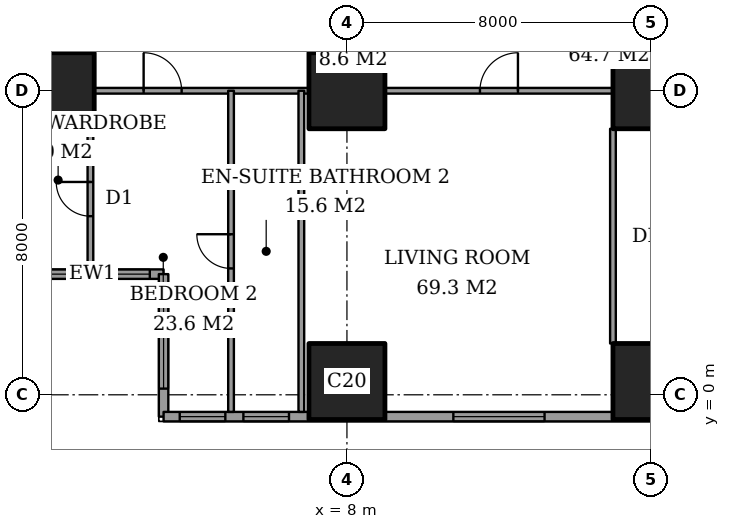
"""IFC4 building model, lengths in metres.
Left out: names, types, materials, properties, quantities, classifications, styles, units other than length and angle.
Written with IfcOpenShell. Run it as: python <this file> out.ifc"""

import sys

from ifc_helpers import new_model, si_unit, direction, frame, frame_2d, origin, origin_2d, place, context, subcontext, project, spatial, rectangle, extrude, element, fill, save


model = new_model("IFC4")
c1 = context("Model", 3, precision=1e-05, world=origin(), true_north=direction((0.0, 1.0)))
c2 = subcontext(c1, "Body", "Model", "MODEL_VIEW")
j1 = project(units=[si_unit("LENGTHUNIT", "METRE"), si_unit("PLANEANGLEUNIT", "RADIAN")], contexts=[c1])
p1 = place(None, origin())
s1 = spatial("IfcSite", under=j1, at=p1, CompositionType="ELEMENT")
p2 = place(p1, origin())
s2 = spatial("IfcBuilding", under=s1, at=p2, CompositionType="ELEMENT")
p3 = place(p2, frame((0.0, 0.0, 87.2)))
s3 = spatial("IfcBuildingStorey", under=s2, at=p3, CompositionType="ELEMENT", Elevation=87.2)
for number, where, z_axis, x_axis in (
    (1, (0.35, 8.0, 0.0), (0.0, 0.0, 1.0), (1.0, 0.0, 0.0)),
    (2, (8.0, 0.35, 0.0), (0.0, 0.0, 1.0), (1.0, 0.0, 0.0)),
    (3, (8.0, 8.0, 0.0), (0.0, 0.0, 1.0), (1.0, 0.0, 0.0)),
    (4, (16.0, 0.35, 0.0), (0.0, 0.0, 1.0), (1.0, 0.0, 0.0)),
    (5, (16.0, 8.0, 0.0), (0.0, 0.0, 1.0), (1.0, 0.0, 0.0)),
):
    element("IfcColumn", number, at=place(p3, frame(where, z_axis=z_axis, x_axis=x_axis)), inside=s3, PredefinedType="COLUMN", context=c2, shape_type="SweptSolid", body=[
        extrude(rectangle(XDim=2.0, YDim=2.0, at=origin_2d()), origin(), (0.0, 0.0, 1.0), 3.6),
    ])
p4 = place(p3, frame((-0.575, 3.175, 0.0), z_axis=(0.0, 0.0, 1.0), x_axis=(1.0, 0.0, 0.0)))
e6 = element("IfcWall", 6, at=p4, inside=s3, PredefinedType="SOLIDWALL", context=c2, shape_type="SweptSolid", body=[
    extrude(rectangle(XDim=3.75, YDim=0.25, at=frame_2d((1.875, 0.0))), origin(), (0.0, 0.0, 1.0), 3.6),
])
p5 = place(p4, frame((0.45, 0.0, 0.6)))
e7 = element("IfcOpeningElement", 7, at=p5, cuts=e6, PredefinedType="OPENING", context=c2, shape_type="SweptSolid", body=[
    extrude(rectangle(XDim=1.2, YDim=2.0, at=frame_2d((0.6, 1.0))), frame((0.0, 0.135, 0.0), z_axis=(0.0, -1.0, 0.0), x_axis=(1.0, 0.0, 0.0)), (0.0, 0.0, 1.0), 0.27),
])
p6 = place(p4, frame((2.188, 0.0, 0.6)))
e8 = element("IfcOpeningElement", 8, at=p6, cuts=e6, PredefinedType="OPENING", context=c2, shape_type="SweptSolid", body=[
    extrude(rectangle(XDim=1.2, YDim=2.0, at=frame_2d((0.6, 1.0))), frame((0.0, 0.135, 0.0), z_axis=(0.0, -1.0, 0.0), x_axis=(1.0, 0.0, 0.0)), (0.0, 0.0, 1.0), 0.27),
])
p7 = place(p3, frame((3.175, 3.175, 0.0), z_axis=(0.0, 0.0, 1.0), x_axis=(0.0, -1.0, 0.0)))
e9 = element("IfcWall", 9, at=p7, inside=s3, PredefinedType="SOLIDWALL", context=c2, shape_type="SweptSolid", body=[
    extrude(rectangle(XDim=3.75, YDim=0.25, at=frame_2d((1.875, 0.0))), origin(), (0.0, 0.0, 1.0), 3.6),
])
p8 = place(p7, frame((0.613, 0.0, 0.6)))
e10 = element("IfcOpeningElement", 10, at=p8, cuts=e9, PredefinedType="OPENING", context=c2, shape_type="SweptSolid", body=[
    extrude(rectangle(XDim=2.4, YDim=2.0, at=frame_2d((1.2, 1.0))), frame((0.0, 0.135, 0.0), z_axis=(0.0, -1.0, 0.0), x_axis=(1.0, 0.0, 0.0)), (0.0, 0.0, 1.0), 0.27),
])
p9 = place(p3, frame((3.175, -0.575, 0.0), z_axis=(0.0, 0.0, 1.0), x_axis=(1.0, 0.0, 0.0)))
e11 = element("IfcWall", 11, at=p9, inside=s3, PredefinedType="SOLIDWALL", context=c2, shape_type="SweptSolid", body=[
    extrude(rectangle(XDim=21.4, YDim=0.25, at=frame_2d((10.7, 0.0))), origin(), (0.0, 0.0, 1.0), 3.6),
])
p10 = place(p9, frame((0.425, 0.0, 0.6)))
e12 = element("IfcOpeningElement", 12, at=p10, cuts=e11, PredefinedType="OPENING", context=c2, shape_type="SweptSolid", body=[
    extrude(rectangle(XDim=1.2, YDim=2.0, at=frame_2d((0.6, 1.0))), frame((0.0, 0.135, 0.0), z_axis=(0.0, -1.0, 0.0), x_axis=(1.0, 0.0, 0.0)), (0.0, 0.0, 1.0), 0.27),
])
p11 = place(p9, frame((2.1, 0.0, 0.6)))
e13 = element("IfcOpeningElement", 13, at=p11, cuts=e11, PredefinedType="OPENING", context=c2, shape_type="SweptSolid", body=[
    extrude(rectangle(XDim=1.2, YDim=2.0, at=frame_2d((0.6, 1.0))), frame((0.0, 0.135, 0.0), z_axis=(0.0, -1.0, 0.0), x_axis=(1.0, 0.0, 0.0)), (0.0, 0.0, 1.0), 0.27),
])
p12 = place(p9, frame((7.625, 0.0, 0.6)))
e14 = element("IfcOpeningElement", 14, at=p12, cuts=e11, PredefinedType="OPENING", context=c2, shape_type="SweptSolid", body=[
    extrude(rectangle(XDim=2.4, YDim=2.0, at=frame_2d((1.2, 1.0))), frame((0.0, 0.135, 0.0), z_axis=(0.0, -1.0, 0.0), x_axis=(1.0, 0.0, 0.0)), (0.0, 0.0, 1.0), 0.27),
])
p13 = place(p9, frame((14.725, 0.0, 0.6)))
e15 = element("IfcOpeningElement", 15, at=p13, cuts=e11, PredefinedType="OPENING", context=c2, shape_type="SweptSolid", body=[
    extrude(rectangle(XDim=1.2, YDim=2.0, at=frame_2d((0.6, 1.0))), frame((0.0, 0.135, 0.0), z_axis=(0.0, -1.0, 0.0), x_axis=(1.0, 0.0, 0.0)), (0.0, 0.0, 1.0), 0.27),
])
p14 = place(p9, frame((17.55, 0.0, 0.6)))
e16 = element("IfcOpeningElement", 16, at=p14, cuts=e11, PredefinedType="OPENING", context=c2, shape_type="SweptSolid", body=[
    extrude(rectangle(XDim=1.2, YDim=2.0, at=frame_2d((0.6, 1.0))), frame((0.0, 0.135, 0.0), z_axis=(0.0, -1.0, 0.0), x_axis=(1.0, 0.0, 0.0)), (0.0, 0.0, 1.0), 0.27),
])
p15 = place(p3, frame((1.35, 8.0, 0.0), z_axis=(0.0, 0.0, 1.0), x_axis=(1.0, 0.0, 0.0)))
e17 = element("IfcWall", 17, at=p15, inside=s3, PredefinedType="PARTITIONING", context=c2, shape_type="SweptSolid", body=[
    extrude(rectangle(XDim=5.65, YDim=0.15, at=frame_2d((2.825, 0.0))), origin(), (0.0, 0.0, 1.0), 3.25),
])
p16 = place(p15, frame((1.3, 0.0, 0.0)))
e18 = element("IfcOpeningElement", 18, at=p16, cuts=e17, PredefinedType="OPENING", context=c2, shape_type="SweptSolid", body=[
    extrude(rectangle(XDim=1.0, YDim=2.1, at=frame_2d((0.5, 1.05))), frame((0.0, 0.085, 0.0), z_axis=(0.0, -1.0, 0.0), x_axis=(1.0, 0.0, 0.0)), (0.0, 0.0, 1.0), 0.17),
])
p17 = place(p3, frame((9.0, 8.0, 0.0), z_axis=(0.0, 0.0, 1.0), x_axis=(1.0, 0.0, 0.0)))
e19 = element("IfcWall", 19, at=p17, inside=s3, PredefinedType="PARTITIONING", context=c2, shape_type="SweptSolid", body=[
    extrude(rectangle(XDim=6.0, YDim=0.15, at=frame_2d((3.0, 0.0))), origin(), (0.0, 0.0, 1.0), 3.25),
])
p18 = place(p17, frame((2.5, 0.0, 0.0)))
e20 = element("IfcOpeningElement", 20, at=p18, cuts=e19, PredefinedType="OPENING", context=c2, shape_type="SweptSolid", body=[
    extrude(rectangle(XDim=1.0, YDim=2.1, at=frame_2d((0.5, 1.05))), frame((0.0, 0.085, 0.0), z_axis=(0.0, -1.0, 0.0), x_axis=(1.0, 0.0, 0.0)), (0.0, 0.0, 1.0), 0.17),
])
p19 = place(p3, frame((1.25, 3.3, 0.0), z_axis=(0.0, 0.0, 1.0), x_axis=(0.0, 1.0, 0.0)))
e21 = element("IfcWall", 21, at=p19, inside=s3, PredefinedType="PARTITIONING", context=c2, shape_type="SweptSolid", body=[
    extrude(rectangle(XDim=3.7, YDim=0.15, at=frame_2d((1.85, 0.0))), origin(), (0.0, 0.0, 1.0), 3.25),
])
p20 = place(p19, frame((1.4, 0.0, 0.0)))
e22 = element("IfcOpeningElement", 22, at=p20, cuts=e21, PredefinedType="OPENING", context=c2, shape_type="SweptSolid", body=[
    extrude(rectangle(XDim=0.9, YDim=2.1, at=frame_2d((0.45, 1.05))), frame((0.0, 0.085, 0.0), z_axis=(0.0, -1.0, 0.0), x_axis=(1.0, 0.0, 0.0)), (0.0, 0.0, 1.0), 0.17),
])
p21 = place(p3, frame((4.95, -0.45, 0.0), z_axis=(0.0, 0.0, 1.0), x_axis=(0.0, 1.0, 0.0)))
e23 = element("IfcWall", 23, at=p21, inside=s3, PredefinedType="PARTITIONING", context=c2, shape_type="SweptSolid", body=[
    extrude(rectangle(XDim=8.45, YDim=0.15, at=frame_2d((4.225, 0.0))), origin(), (0.0, 0.0, 1.0), 3.25),
])
p22 = place(p21, frame((3.775, 0.0, 0.0)))
e24 = element("IfcOpeningElement", 24, at=p22, cuts=e23, PredefinedType="OPENING", context=c2, shape_type="SweptSolid", body=[
    extrude(rectangle(XDim=0.9, YDim=2.1, at=frame_2d((0.45, 1.05))), frame((0.0, 0.085, 0.0), z_axis=(0.0, -1.0, 0.0), x_axis=(1.0, 0.0, 0.0)), (0.0, 0.0, 1.0), 0.17),
])
p23 = place(p3, frame((6.8, -0.45, 0.0), z_axis=(0.0, 0.0, 1.0), x_axis=(0.0, 1.0, 0.0)))
e25 = element("IfcWall", 25, at=p23, inside=s3, PredefinedType="PARTITIONING", context=c2, shape_type="SweptSolid", body=[
    extrude(rectangle(XDim=8.45, YDim=0.15, at=frame_2d((4.225, 0.0))), origin(), (0.0, 0.0, 1.0), 3.25),
])
p24 = place(p3, frame((15.0, 1.35, 0.0), z_axis=(0.0, 0.0, 1.0), x_axis=(0.0, 1.0, 0.0)))
e26 = element("IfcWall", 26, at=p24, inside=s3, PredefinedType="PARTITIONING", context=c2, shape_type="SweptSolid", body=[
    extrude(rectangle(XDim=5.65, YDim=0.15, at=frame_2d((2.825, 0.0))), origin(), (0.0, 0.0, 1.0), 3.25),
])
p25 = place(p5, origin())
e27 = element("IfcWindow", 27, at=p25, inside=s3, PartitioningType="SINGLE_PANEL", PredefinedType="WINDOW", context=c2, shape_type="SweptSolid", body=[
    extrude(rectangle(XDim=1.2, YDim=2.0, at=frame_2d((0.6, 1.0))), frame((0.0, 0.03, 0.0), z_axis=(0.0, -1.0, 0.0), x_axis=(1.0, 0.0, 0.0)), (0.0, 0.0, 1.0), 0.06),
])
fill(e7, e27)
p26 = place(p6, origin())
e28 = element("IfcWindow", 28, at=p26, inside=s3, PartitioningType="SINGLE_PANEL", PredefinedType="WINDOW", context=c2, shape_type="SweptSolid", body=[
    extrude(rectangle(XDim=1.2, YDim=2.0, at=frame_2d((0.6, 1.0))), frame((0.0, 0.03, 0.0), z_axis=(0.0, -1.0, 0.0), x_axis=(1.0, 0.0, 0.0)), (0.0, 0.0, 1.0), 0.06),
])
fill(e8, e28)
p27 = place(p8, origin())
e29 = element("IfcWindow", 29, at=p27, inside=s3, PartitioningType="SINGLE_PANEL", PredefinedType="WINDOW", context=c2, shape_type="SweptSolid", body=[
    extrude(rectangle(XDim=2.4, YDim=2.0, at=frame_2d((1.2, 1.0))), frame((0.0, 0.03, 0.0), z_axis=(0.0, -1.0, 0.0), x_axis=(1.0, 0.0, 0.0)), (0.0, 0.0, 1.0), 0.06),
])
fill(e10, e29)
p28 = place(p10, origin())
e30 = element("IfcWindow", 30, at=p28, inside=s3, PartitioningType="SINGLE_PANEL", PredefinedType="WINDOW", context=c2, shape_type="SweptSolid", body=[
    extrude(rectangle(XDim=1.2, YDim=2.0, at=frame_2d((0.6, 1.0))), frame((0.0, 0.03, 0.0), z_axis=(0.0, -1.0, 0.0), x_axis=(1.0, 0.0, 0.0)), (0.0, 0.0, 1.0), 0.06),
])
fill(e12, e30)
p29 = place(p11, origin())
e31 = element("IfcWindow", 31, at=p29, inside=s3, PartitioningType="SINGLE_PANEL", PredefinedType="WINDOW", context=c2, shape_type="SweptSolid", body=[
    extrude(rectangle(XDim=1.2, YDim=2.0, at=frame_2d((0.6, 1.0))), frame((0.0, 0.03, 0.0), z_axis=(0.0, -1.0, 0.0), x_axis=(1.0, 0.0, 0.0)), (0.0, 0.0, 1.0), 0.06),
])
fill(e13, e31)
p30 = place(p12, origin())
e32 = element("IfcWindow", 32, at=p30, inside=s3, PartitioningType="SINGLE_PANEL", PredefinedType="WINDOW", context=c2, shape_type="SweptSolid", body=[
    extrude(rectangle(XDim=2.4, YDim=2.0, at=frame_2d((1.2, 1.0))), frame((0.0, 0.03, 0.0), z_axis=(0.0, -1.0, 0.0), x_axis=(1.0, 0.0, 0.0)), (0.0, 0.0, 1.0), 0.06),
])
fill(e14, e32)
p31 = place(p20, origin())
e33 = element("IfcDoor", 33, at=p31, inside=s3, OperationType="SINGLE_SWING_LEFT", PredefinedType="DOOR", context=c2, shape_type="SweptSolid", body=[
    extrude(rectangle(XDim=0.9, YDim=2.1, at=frame_2d((0.45, 1.05))), frame((0.0, 0.025, 0.0), z_axis=(0.0, -1.0, 0.0), x_axis=(1.0, 0.0, 0.0)), (0.0, 0.0, 1.0), 0.05),
])
fill(e22, e33)
p32 = place(p16, origin())
e34 = element("IfcDoor", 34, at=p32, inside=s3, OperationType="SINGLE_SWING_RIGHT", PredefinedType="DOOR", context=c2, shape_type="SweptSolid", body=[
    extrude(rectangle(XDim=1.0, YDim=2.1, at=frame_2d((0.5, 1.05))), frame((0.0, 0.025, 0.0), z_axis=(0.0, -1.0, 0.0), x_axis=(1.0, 0.0, 0.0)), (0.0, 0.0, 1.0), 0.05),
])
fill(e18, e34)
p33 = place(p22, origin())
e35 = element("IfcDoor", 35, at=p33, inside=s3, OperationType="SINGLE_SWING_LEFT", PredefinedType="DOOR", context=c2, shape_type="SweptSolid", body=[
    extrude(rectangle(XDim=0.9, YDim=2.1, at=frame_2d((0.45, 1.05))), frame((0.0, 0.025, 0.0), z_axis=(0.0, -1.0, 0.0), x_axis=(1.0, 0.0, 0.0)), (0.0, 0.0, 1.0), 0.05),
])
fill(e24, e35)
p34 = place(p18, origin())
e36 = element("IfcDoor", 36, at=p34, inside=s3, OperationType="SINGLE_SWING_LEFT", PredefinedType="DOOR", context=c2, shape_type="SweptSolid", body=[
    extrude(rectangle(XDim=1.0, YDim=2.1, at=frame_2d((0.5, 1.05))), frame((0.0, 0.025, 0.0), z_axis=(0.0, -1.0, 0.0), x_axis=(1.0, 0.0, 0.0)), (0.0, 0.0, 1.0), 0.05),
])
fill(e20, e36)
save(model, sys.argv[1])
